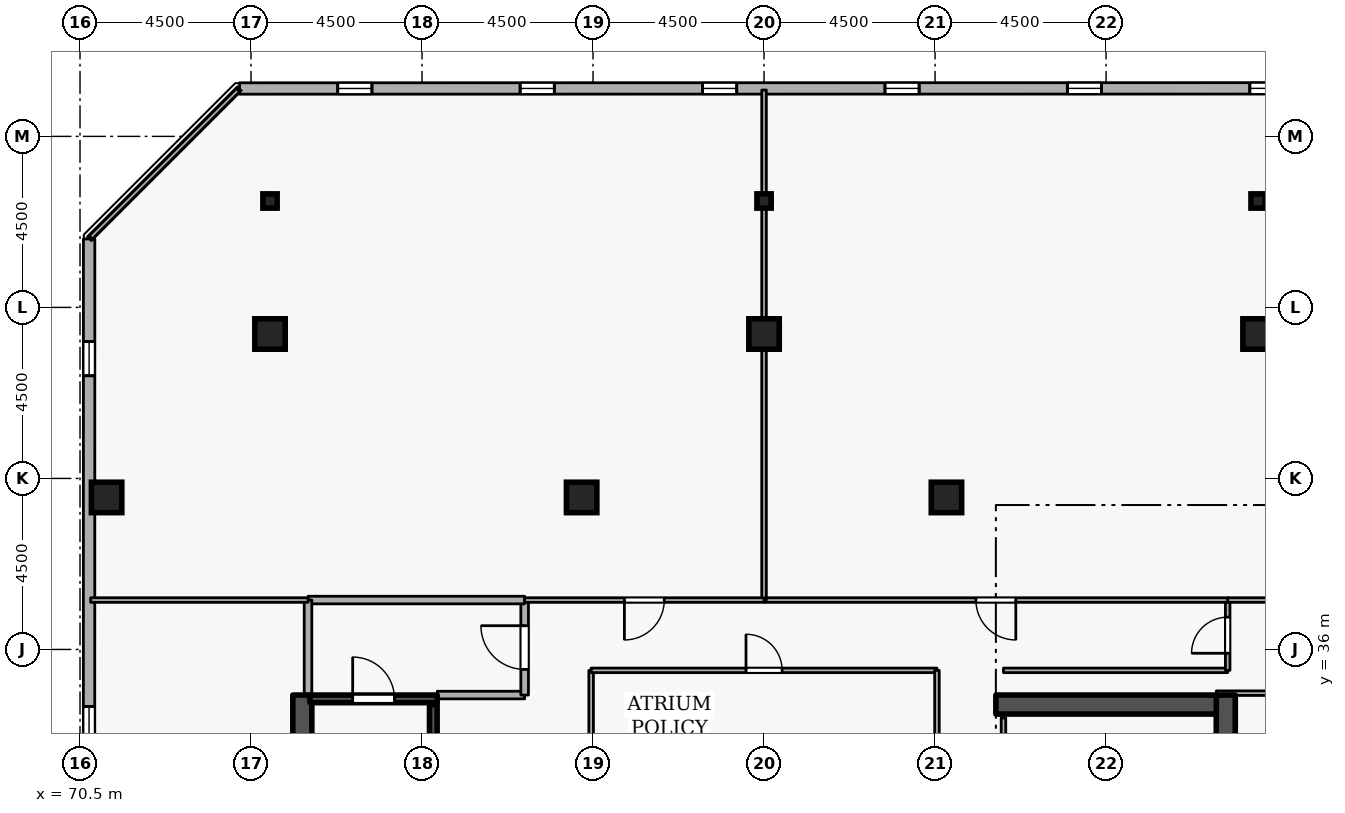
"""IFC4 building model, lengths in metres.
Left out: names, types, materials, properties, quantities, classifications, styles, units other than length and angle.
Written with IfcOpenShell. Run it as: python <this file> out.ifc"""

import sys

from ifc_helpers import new_model, si_unit, direction, frame, frame_2d, origin, origin_2d, place, context, subcontext, project, spatial, rectangle, i_section, extrude, element, fill, save


model = new_model("IFC4")
c1 = context("Model", 3, precision=1e-05, world=origin(), true_north=direction((0.0, 1.0)))
c2 = subcontext(c1, "Body", "Model", "MODEL_VIEW")
j1 = project(units=[si_unit("LENGTHUNIT", "METRE"), si_unit("PLANEANGLEUNIT", "RADIAN")], contexts=[c1])
p1 = place(None, origin())
s1 = spatial("IfcSite", under=j1, at=p1, CompositionType="ELEMENT")
p2 = place(p1, origin())
s2 = spatial("IfcBuilding", under=s1, at=p2, CompositionType="ELEMENT")
p3 = place(p2, frame((0.0, 0.0, 258.3)))
s3 = spatial("IfcBuildingStorey", under=s2, at=p3, CompositionType="ELEMENT", Elevation=258.3)
p4 = place(p3, frame((100.65, 19.2, 0.0), z_axis=(0.0, 0.0, 1.0), x_axis=(0.0, 1.0, 0.0)))
e1 = element("IfcWall", 1, at=p4, inside=s3, PredefinedType="SHEAR", context=c2, shape_type="SweptSolid", body=[
    extrude(rectangle(XDim=15.6, YDim=0.5, at=frame_2d((7.8, 0.0))), origin(), (0.0, 0.0, 1.0), 3.6),
])
p5 = place(p3, frame((94.6, 34.55, 0.0), z_axis=(0.0, 0.0, 1.0), x_axis=(1.0, 0.0, 0.0)))
e2 = element("IfcWall", 2, at=p5, inside=s3, PredefinedType="SHEAR", context=c2, shape_type="SweptSolid", body=[
    extrude(rectangle(XDim=5.8, YDim=0.5, at=frame_2d((2.9, 0.0))), origin(), (0.0, 0.0, 1.0), 3.6),
])
p6 = place(p3, frame((76.35, 19.2, 0.0), z_axis=(0.0, 0.0, 1.0), x_axis=(0.0, 1.0, 0.0)))
e3 = element("IfcWall", 3, at=p6, inside=s3, PredefinedType="SHEAR", context=c2, shape_type="SweptSolid", body=[
    extrude(rectangle(XDim=15.6, YDim=0.5, at=frame_2d((7.8, 0.0))), origin(), (0.0, 0.0, 1.0), 3.6),
])
for number, where, z_axis, x_axis in (
    (4, (101.5, 44.3, 0.0), (0.0, 0.0, 1.0), (1.0, 0.0, 0.0)),
    (5, (88.5, 44.3, 0.0), (0.0, 0.0, 1.0), (1.0, 0.0, 0.0)),
    (6, (75.5, 44.3, 0.0), (0.0, 0.0, 1.0), (1.0, 0.0, 0.0)),
    (7, (71.2, 40.0, 0.0), (0.0, 0.0, 1.0), (1.0, 0.0, 0.0)),
    (8, (93.3, 40.0, 0.0), (0.0, 0.0, 1.0), (1.0, 0.0, 0.0)),
    (9, (83.7, 40.0, 0.0), (0.0, 0.0, 1.0), (1.0, 0.0, 0.0)),
):
    element("IfcColumn", number, at=place(p3, frame(where, z_axis=z_axis, x_axis=x_axis)), inside=s3, PredefinedType="COLUMN", context=c2, shape_type="SweptSolid", body=[
        extrude(rectangle(XDim=0.8, YDim=0.8, at=origin_2d()), origin(), (0.0, 0.0, 1.0), 3.6),
    ])
for number, where, z_axis, x_axis in (
    (10, (101.5, 47.8, 0.0), (0.0, 0.0, 1.0), (1.0, 0.0, 0.0)),
    (11, (88.5, 47.8, 0.0), (0.0, 0.0, 1.0), (1.0, 0.0, 0.0)),
    (12, (75.5, 47.8, 0.0), (0.0, 0.0, 1.0), (1.0, 0.0, 0.0)),
):
    element("IfcColumn", number, at=place(p3, frame(where, z_axis=z_axis, x_axis=x_axis)), inside=s3, PredefinedType="COLUMN", context=c2, shape_type="SweptSolid", body=[
        extrude(i_section(OverallWidth=0.375, OverallDepth=0.375, WebThickness=0.017, FlangeThickness=0.027, FilletRadius=0.015, at=origin_2d()), origin(), (0.0, 0.0, 1.0), 3.6),
    ])
p7 = place(p3, frame((109.681, 50.765, 0.0), z_axis=(0.0, 0.0, 1.0), x_axis=(-0.999999991209, -0.000132597301, 0.0)))
e13 = element("IfcWall", 13, at=p7, inside=s3, PredefinedType="STANDARD", context=c2, shape_type="SweptSolid", body=[
    extrude(rectangle(XDim=34.983, YDim=0.3, at=frame_2d((17.492, 0.0))), origin(), (0.0, 0.0, 1.0), 2.7),
])
p8 = place(p7, frame((2.7, 0.0, 0.72)))
e14 = element("IfcOpeningElement", 14, at=p8, cuts=e13, PredefinedType="OPENING", context=c2, shape_type="SweptSolid", body=[
    extrude(rectangle(XDim=0.9, YDim=1.75, at=frame_2d((0.45, 0.875))), frame((0.0, 0.16, 0.0), z_axis=(0.0, -1.0, 0.0), x_axis=(1.0, 0.0, 0.0)), (0.0, 0.0, 1.0), 0.32),
])
p9 = place(p7, frame((7.5, 0.0, 0.72)))
e15 = element("IfcOpeningElement", 15, at=p9, cuts=e13, PredefinedType="OPENING", context=c2, shape_type="SweptSolid", body=[
    extrude(rectangle(XDim=0.9, YDim=1.75, at=frame_2d((0.45, 0.875))), frame((0.0, 0.16, 0.0), z_axis=(0.0, -1.0, 0.0), x_axis=(1.0, 0.0, 0.0)), (0.0, 0.0, 1.0), 0.32),
])
p10 = place(p7, frame((12.3, 0.0, 0.72)))
e16 = element("IfcOpeningElement", 16, at=p10, cuts=e13, PredefinedType="OPENING", context=c2, shape_type="SweptSolid", body=[
    extrude(rectangle(XDim=0.9, YDim=1.75, at=frame_2d((0.45, 0.875))), frame((0.0, 0.16, 0.0), z_axis=(0.0, -1.0, 0.0), x_axis=(1.0, 0.0, 0.0)), (0.0, 0.0, 1.0), 0.32),
])
p11 = place(p7, frame((17.1, 0.0, 0.72)))
e17 = element("IfcOpeningElement", 17, at=p11, cuts=e13, PredefinedType="OPENING", context=c2, shape_type="SweptSolid", body=[
    extrude(rectangle(XDim=0.9, YDim=1.75, at=frame_2d((0.45, 0.875))), frame((0.0, 0.16, 0.0), z_axis=(0.0, -1.0, 0.0), x_axis=(1.0, 0.0, 0.0)), (0.0, 0.0, 1.0), 0.32),
])
p12 = place(p7, frame((21.9, 0.0, 0.72)))
e18 = element("IfcOpeningElement", 18, at=p12, cuts=e13, PredefinedType="OPENING", context=c2, shape_type="SweptSolid", body=[
    extrude(rectangle(XDim=0.9, YDim=1.75, at=frame_2d((0.45, 0.875))), frame((0.0, 0.16, 0.0), z_axis=(0.0, -1.0, 0.0), x_axis=(1.0, 0.0, 0.0)), (0.0, 0.0, 1.0), 0.32),
])
p13 = place(p7, frame((26.7, 0.0, 0.72)))
e19 = element("IfcOpeningElement", 19, at=p13, cuts=e13, PredefinedType="OPENING", context=c2, shape_type="SweptSolid", body=[
    extrude(rectangle(XDim=0.9, YDim=1.75, at=frame_2d((0.45, 0.875))), frame((0.0, 0.16, 0.0), z_axis=(0.0, -1.0, 0.0), x_axis=(1.0, 0.0, 0.0)), (0.0, 0.0, 1.0), 0.32),
])
p14 = place(p7, frame((31.5, 0.0, 0.72)))
e20 = element("IfcOpeningElement", 20, at=p14, cuts=e13, PredefinedType="OPENING", context=c2, shape_type="SweptSolid", body=[
    extrude(rectangle(XDim=0.9, YDim=1.75, at=frame_2d((0.45, 0.875))), frame((0.0, 0.16, 0.0), z_axis=(0.0, -1.0, 0.0), x_axis=(1.0, 0.0, 0.0)), (0.0, 0.0, 1.0), 0.32),
])
p15 = place(p3, frame((70.74, 46.802, 0.0), z_axis=(0.0, 0.0, 1.0), x_axis=(-0.000132597301, -0.999999991209, 0.0)))
e21 = element("IfcWall", 21, at=p15, inside=s3, PredefinedType="STANDARD", context=c2, shape_type="SweptSolid", body=[
    extrude(rectangle(XDim=34.983, YDim=0.3, at=frame_2d((17.492, 0.0))), origin(), (0.0, 0.0, 1.0), 2.7),
])
p16 = place(p15, frame((2.7, 0.0, 0.72)))
e22 = element("IfcOpeningElement", 22, at=p16, cuts=e21, PredefinedType="OPENING", context=c2, shape_type="SweptSolid", body=[
    extrude(rectangle(XDim=0.9, YDim=1.75, at=frame_2d((0.45, 0.875))), frame((0.0, 0.16, 0.0), z_axis=(0.0, -1.0, 0.0), x_axis=(1.0, 0.0, 0.0)), (0.0, 0.0, 1.0), 0.32),
])
p17 = place(p15, frame((12.3, 0.0, 0.72)))
e23 = element("IfcOpeningElement", 23, at=p17, cuts=e21, PredefinedType="OPENING", context=c2, shape_type="SweptSolid", body=[
    extrude(rectangle(XDim=0.9, YDim=1.75, at=frame_2d((0.45, 0.875))), frame((0.0, 0.16, 0.0), z_axis=(0.0, -1.0, 0.0), x_axis=(1.0, 0.0, 0.0)), (0.0, 0.0, 1.0), 0.32),
])
p18 = place(p15, frame((17.1, 0.0, 0.72)))
e24 = element("IfcOpeningElement", 24, at=p18, cuts=e21, PredefinedType="OPENING", context=c2, shape_type="SweptSolid", body=[
    extrude(rectangle(XDim=0.9, YDim=1.75, at=frame_2d((0.45, 0.875))), frame((0.0, 0.16, 0.0), z_axis=(0.0, -1.0, 0.0), x_axis=(1.0, 0.0, 0.0)), (0.0, 0.0, 1.0), 0.32),
])
p19 = place(p15, frame((21.9, 0.0, 0.72)))
e25 = element("IfcOpeningElement", 25, at=p19, cuts=e21, PredefinedType="OPENING", context=c2, shape_type="SweptSolid", body=[
    extrude(rectangle(XDim=0.9, YDim=1.75, at=frame_2d((0.45, 0.875))), frame((0.0, 0.16, 0.0), z_axis=(0.0, -1.0, 0.0), x_axis=(1.0, 0.0, 0.0)), (0.0, 0.0, 1.0), 0.32),
])
p20 = place(p3, frame((76.55, 34.7, 0.0), z_axis=(0.0, 0.0, 1.0), x_axis=(1.0, 0.0, 0.0)))
e26 = element("IfcWall", 26, at=p20, inside=s3, PredefinedType="SHEAR", context=c2, shape_type="SweptSolid", body=[
    extrude(rectangle(XDim=3.35, YDim=0.2, at=frame_2d((1.675, 0.0))), origin(), (0.0, 0.0, 1.0), 3.6),
])
p21 = place(p20, frame((1.125, 0.0, 0.0)))
e27 = element("IfcOpeningElement", 27, at=p21, cuts=e26, PredefinedType="OPENING", context=c2, shape_type="SweptSolid", body=[
    extrude(rectangle(XDim=1.1, YDim=2.1, at=frame_2d((0.55, 1.05))), frame((0.0, 0.11, 0.0), z_axis=(0.0, -1.0, 0.0), x_axis=(1.0, 0.0, 0.0)), (0.0, 0.0, 1.0), 0.22),
])
p22 = place(p3, frame((79.797, 27.45, 0.0), z_axis=(0.0, 0.0, 1.0), x_axis=(0.0, 1.0, 0.0)))
e28 = element("IfcWall", 28, at=p22, inside=s3, PredefinedType="SHEAR", context=c2, shape_type="SweptSolid", body=[
    extrude(rectangle(XDim=7.1, YDim=0.2, at=frame_2d((3.55, 0.0))), origin(), (0.0, 0.0, 1.0), 3.6),
])
p23 = place(p3, frame((79.9, 34.8, 0.0), z_axis=(0.0, 0.0, 1.0), x_axis=(1.0, 0.0, 0.0)))
e29 = element("IfcWall", 29, at=p23, inside=s3, PredefinedType="STANDARD", context=c2, shape_type="SweptSolid", body=[
    extrude(rectangle(XDim=2.3, YDim=0.2, at=frame_2d((1.15, 0.0))), origin(), (0.0, 0.0, 1.0), 2.545),
])
p24 = place(p3, frame((82.2, 34.8, 0.0), z_axis=(0.0, 0.0, 1.0), x_axis=(0.0, 1.0, 0.0)))
e30 = element("IfcWall", 30, at=p24, inside=s3, PredefinedType="STANDARD", context=c2, shape_type="SweptSolid", body=[
    extrude(rectangle(XDim=2.5, YDim=0.2, at=frame_2d((1.25, 0.0))), origin(), (0.0, 0.0, 1.0), 3.34),
])
p25 = place(p24, frame((0.675, 0.0, 0.0)))
e31 = element("IfcOpeningElement", 31, at=p25, cuts=e30, PredefinedType="OPENING", context=c2, shape_type="SweptSolid", body=[
    extrude(rectangle(XDim=1.15, YDim=2.1, at=frame_2d((0.575, 1.05))), frame((0.0, 0.11, 0.0), z_axis=(0.0, -1.0, 0.0), x_axis=(1.0, 0.0, 0.0)), (0.0, 0.0, 1.0), 0.22),
])
p26 = place(p3, frame((82.2, 37.3, 0.0), z_axis=(0.0, 0.0, 1.0), x_axis=(-1.0, 0.0, 0.0)))
e32 = element("IfcWall", 32, at=p26, inside=s3, PredefinedType="STANDARD", context=c2, shape_type="SweptSolid", body=[
    extrude(rectangle(XDim=5.7, YDim=0.2, at=frame_2d((2.85, 0.0))), origin(), (0.0, 0.0, 1.0), 3.34),
])
p27 = place(p3, frame((76.5, 37.3, 0.0), z_axis=(0.0, 0.0, 1.0), x_axis=(0.0, -1.0, 0.0)))
e33 = element("IfcWall", 33, at=p27, inside=s3, PredefinedType="STANDARD", context=c2, shape_type="SweptSolid", body=[
    extrude(rectangle(XDim=2.5, YDim=0.2, at=frame_2d((1.25, 0.0))), origin(), (0.0, 0.0, 1.0), 3.34),
])
p28 = place(p3, frame((94.8, 32.1, 0.0), z_axis=(0.0, 0.0, 1.0), x_axis=(0.0, 1.0, 0.0)))
e34 = element("IfcWall", 34, at=p28, inside=s3, PredefinedType="PARTITIONING", context=c2, shape_type="SweptSolid", body=[
    extrude(rectangle(XDim=2.1, YDim=0.12, at=frame_2d((1.05, 0.0))), origin(), (0.0, 0.0, 1.0), 3.34),
])
p29 = place(p28, frame((0.575, 0.0, 0.0)))
e35 = element("IfcOpeningElement", 35, at=p29, cuts=e34, PredefinedType="OPENING", context=c2, shape_type="SweptSolid", body=[
    extrude(rectangle(XDim=0.95, YDim=2.1, at=frame_2d((0.475, 1.05))), frame((0.0, 0.07, 0.0), z_axis=(0.0, -1.0, 0.0), x_axis=(1.0, 0.0, 0.0)), (0.0, 0.0, 1.0), 0.14),
])
p30 = place(p3, frame((94.8, 35.45, 0.0), z_axis=(0.0, 0.0, 1.0), x_axis=(1.0, 0.0, 0.0)))
e36 = element("IfcWall", 36, at=p30, inside=s3, PredefinedType="PARTITIONING", context=c2, shape_type="SweptSolid", body=[
    extrude(rectangle(XDim=5.9, YDim=0.12, at=frame_2d((2.95, 0.0))), origin(), (0.0, 0.0, 1.0), 3.34),
])
p31 = place(p3, frame((100.7, 35.45, 0.0), z_axis=(0.0, 0.0, 1.0), x_axis=(0.0, 1.0, 0.0)))
e37 = element("IfcWall", 37, at=p31, inside=s3, PredefinedType="PARTITIONING", context=c2, shape_type="SweptSolid", body=[
    extrude(rectangle(XDim=1.85, YDim=0.12, at=frame_2d((0.925, 0.0))), origin(), (0.0, 0.0, 1.0), 3.34),
])
p32 = place(p31, frame((0.45, 0.0, 0.0)))
e38 = element("IfcOpeningElement", 38, at=p32, cuts=e37, PredefinedType="OPENING", context=c2, shape_type="SweptSolid", body=[
    extrude(rectangle(XDim=0.95, YDim=2.1, at=frame_2d((0.475, 1.05))), frame((0.0, 0.07, 0.0), z_axis=(0.0, -1.0, 0.0), x_axis=(1.0, 0.0, 0.0)), (0.0, 0.0, 1.0), 0.14),
])
p33 = place(p3, frame((100.7, 37.3, 0.0), z_axis=(0.0, 0.0, 1.0), x_axis=(1.0, 0.0, 0.0)))
e39 = element("IfcWall", 39, at=p33, inside=s3, PredefinedType="PARTITIONING", context=c2, shape_type="SweptSolid", body=[
    extrude(rectangle(XDim=11.52, YDim=0.12, at=frame_2d((5.76, 0.0))), origin(), (0.0, 0.0, 1.0), 3.34),
])
p34 = place(p3, frame((112.22, 34.85, 0.0), z_axis=(0.0, 0.0, 1.0), x_axis=(-1.0, 0.0, 0.0)))
e40 = element("IfcWall", 40, at=p34, inside=s3, PredefinedType="PARTITIONING", context=c2, shape_type="SweptSolid", body=[
    extrude(rectangle(XDim=11.82, YDim=0.12, at=frame_2d((5.91, 0.0))), origin(), (0.0, 0.0, 1.0), 2.545),
])
p35 = place(p3, frame((100.7, 37.3, 0.0), z_axis=(0.0, 0.0, 1.0), x_axis=(-1.0, 0.0, 0.0)))
e41 = element("IfcWall", 41, at=p35, inside=s3, PredefinedType="PARTITIONING", context=c2, shape_type="SweptSolid", body=[
    extrude(rectangle(XDim=12.2, YDim=0.12, at=frame_2d((6.1, 0.0))), origin(), (0.0, 0.0, 1.0), 3.34),
])
p36 = place(p35, frame((5.575, 0.0, 0.0)))
e42 = element("IfcOpeningElement", 42, at=p36, cuts=e41, PredefinedType="OPENING", context=c2, shape_type="SweptSolid", body=[
    extrude(rectangle(XDim=1.05, YDim=2.1, at=frame_2d((0.525, 1.05))), frame((0.0, 0.07, 0.0), z_axis=(0.0, -1.0, 0.0), x_axis=(1.0, 0.0, 0.0)), (0.0, 0.0, 1.0), 0.14),
])
p37 = place(p3, frame((88.5, 37.3, 0.0), z_axis=(0.0, 0.0, 1.0), x_axis=(0.0, 1.0, 0.0)))
e43 = element("IfcWall", 43, at=p37, inside=s3, PredefinedType="PARTITIONING", context=c2, shape_type="SweptSolid", body=[
    extrude(rectangle(XDim=13.42, YDim=0.12, at=frame_2d((6.71, 0.0))), origin(), (0.0, 0.0, 1.0), 2.932),
])
p38 = place(p3, frame((76.5, 37.3, 0.0), z_axis=(0.0, 0.0, 1.0), x_axis=(-1.0, 0.0, 0.0)))
e44 = element("IfcWall", 44, at=p38, inside=s3, PredefinedType="PARTITIONING", context=c2, shape_type="SweptSolid", body=[
    extrude(rectangle(XDim=5.72, YDim=0.12, at=frame_2d((2.86, 0.0))), origin(), (0.0, 0.0, 1.0), 3.34),
])
p39 = place(p3, frame((70.78, 46.84, 0.0), z_axis=(0.0, 0.0, 1.0), x_axis=(0.707106781187, 0.707106781187, 0.0)))
e45 = element("IfcWall", 45, at=p39, inside=s3, PredefinedType="PARTITIONING", context=c2, shape_type="SweptSolid", body=[
    extrude(rectangle(XDim=5.487, YDim=0.12, at=frame_2d((2.743, 0.0))), origin(), (0.0, 0.0, 1.0), 3.34),
])
p40 = place(p3, frame((88.5, 37.3, 0.0), z_axis=(0.0, 0.0, 1.0), x_axis=(-1.0, 0.0, 0.0)))
e46 = element("IfcWall", 46, at=p40, inside=s3, PredefinedType="PARTITIONING", context=c2, shape_type="SweptSolid", body=[
    extrude(rectangle(XDim=6.3, YDim=0.12, at=frame_2d((3.15, 0.0))), origin(), (0.0, 0.0, 1.0), 3.34),
])
p41 = place(p40, frame((2.625, 0.0, 0.0)))
e47 = element("IfcOpeningElement", 47, at=p41, cuts=e46, PredefinedType="OPENING", context=c2, shape_type="SweptSolid", body=[
    extrude(rectangle(XDim=1.05, YDim=2.1, at=frame_2d((0.525, 1.05))), frame((0.0, 0.07, 0.0), z_axis=(0.0, -1.0, 0.0), x_axis=(1.0, 0.0, 0.0)), (0.0, 0.0, 1.0), 0.14),
])
p42 = place(p3, frame((83.95, 32.2, 0.0), z_axis=(0.0, 0.0, 1.0), x_axis=(0.0, 1.0, 0.0)))
e48 = element("IfcWall", 48, at=p42, inside=s3, PredefinedType="PARTITIONING", context=c2, shape_type="SweptSolid", body=[
    extrude(rectangle(XDim=3.25, YDim=0.12, at=frame_2d((1.625, 0.0))), origin(), (0.0, 0.0, 1.0), 3.34),
])
p43 = place(p3, frame((83.95, 35.45, 0.0), z_axis=(0.0, 0.0, 1.0), x_axis=(1.0, 0.0, 0.0)))
e49 = element("IfcWall", 49, at=p43, inside=s3, PredefinedType="PARTITIONING", context=c2, shape_type="SweptSolid", body=[
    extrude(rectangle(XDim=9.1, YDim=0.12, at=frame_2d((4.55, 0.0))), origin(), (0.0, 0.0, 1.0), 3.34),
])
p44 = place(p43, frame((4.075, 0.0, 0.0)))
e50 = element("IfcOpeningElement", 50, at=p44, cuts=e49, PredefinedType="OPENING", context=c2, shape_type="SweptSolid", body=[
    extrude(rectangle(XDim=0.95, YDim=2.1, at=frame_2d((0.475, 1.05))), frame((0.0, 0.07, 0.0), z_axis=(0.0, -1.0, 0.0), x_axis=(1.0, 0.0, 0.0)), (0.0, 0.0, 1.0), 0.14),
])
p45 = place(p3, frame((93.05, 35.45, 0.0), z_axis=(0.0, 0.0, 1.0), x_axis=(0.0, -1.0, 0.0)))
e51 = element("IfcWall", 51, at=p45, inside=s3, PredefinedType="PARTITIONING", context=c2, shape_type="SweptSolid", body=[
    extrude(rectangle(XDim=3.25, YDim=0.12, at=frame_2d((1.625, 0.0))), origin(), (0.0, 0.0, 1.0), 3.34),
])
p46 = place(p9, origin())
e52 = element("IfcWindow", 52, at=p46, inside=s3, PartitioningType="SINGLE_PANEL", PredefinedType="WINDOW", context=c2, shape_type="SweptSolid", body=[
    extrude(rectangle(XDim=0.9, YDim=1.75, at=frame_2d((0.45, 0.875))), frame((0.0, 0.03, 0.0), z_axis=(0.0, -1.0, 0.0), x_axis=(1.0, 0.0, 0.0)), (0.0, 0.0, 1.0), 0.06),
])
fill(e15, e52)
p47 = place(p10, origin())
e53 = element("IfcWindow", 53, at=p47, inside=s3, PartitioningType="SINGLE_PANEL", PredefinedType="WINDOW", context=c2, shape_type="SweptSolid", body=[
    extrude(rectangle(XDim=0.9, YDim=1.75, at=frame_2d((0.45, 0.875))), frame((0.0, 0.03, 0.0), z_axis=(0.0, -1.0, 0.0), x_axis=(1.0, 0.0, 0.0)), (0.0, 0.0, 1.0), 0.06),
])
fill(e16, e53)
p48 = place(p11, origin())
e54 = element("IfcWindow", 54, at=p48, inside=s3, PartitioningType="SINGLE_PANEL", PredefinedType="WINDOW", context=c2, shape_type="SweptSolid", body=[
    extrude(rectangle(XDim=0.9, YDim=1.75, at=frame_2d((0.45, 0.875))), frame((0.0, 0.03, 0.0), z_axis=(0.0, -1.0, 0.0), x_axis=(1.0, 0.0, 0.0)), (0.0, 0.0, 1.0), 0.06),
])
fill(e17, e54)
p49 = place(p12, origin())
e55 = element("IfcWindow", 55, at=p49, inside=s3, PartitioningType="SINGLE_PANEL", PredefinedType="WINDOW", context=c2, shape_type="SweptSolid", body=[
    extrude(rectangle(XDim=0.9, YDim=1.75, at=frame_2d((0.45, 0.875))), frame((0.0, 0.03, 0.0), z_axis=(0.0, -1.0, 0.0), x_axis=(1.0, 0.0, 0.0)), (0.0, 0.0, 1.0), 0.06),
])
fill(e18, e55)
p50 = place(p13, origin())
e56 = element("IfcWindow", 56, at=p50, inside=s3, PartitioningType="SINGLE_PANEL", PredefinedType="WINDOW", context=c2, shape_type="SweptSolid", body=[
    extrude(rectangle(XDim=0.9, YDim=1.75, at=frame_2d((0.45, 0.875))), frame((0.0, 0.03, 0.0), z_axis=(0.0, -1.0, 0.0), x_axis=(1.0, 0.0, 0.0)), (0.0, 0.0, 1.0), 0.06),
])
fill(e19, e56)
p51 = place(p14, origin())
e57 = element("IfcWindow", 57, at=p51, inside=s3, PartitioningType="SINGLE_PANEL", PredefinedType="WINDOW", context=c2, shape_type="SweptSolid", body=[
    extrude(rectangle(XDim=0.9, YDim=1.75, at=frame_2d((0.45, 0.875))), frame((0.0, 0.03, 0.0), z_axis=(0.0, -1.0, 0.0), x_axis=(1.0, 0.0, 0.0)), (0.0, 0.0, 1.0), 0.06),
])
fill(e20, e57)
p52 = place(p16, origin())
e58 = element("IfcWindow", 58, at=p52, inside=s3, PartitioningType="SINGLE_PANEL", PredefinedType="WINDOW", context=c2, shape_type="SweptSolid", body=[
    extrude(rectangle(XDim=0.9, YDim=1.75, at=frame_2d((0.45, 0.875))), frame((0.0, 0.03, 0.0), z_axis=(0.0, -1.0, 0.0), x_axis=(1.0, 0.0, 0.0)), (0.0, 0.0, 1.0), 0.06),
])
fill(e22, e58)
p53 = place(p17, origin())
e59 = element("IfcWindow", 59, at=p53, inside=s3, PartitioningType="SINGLE_PANEL", PredefinedType="WINDOW", context=c2, shape_type="SweptSolid", body=[
    extrude(rectangle(XDim=0.9, YDim=1.75, at=frame_2d((0.45, 0.875))), frame((0.0, 0.03, 0.0), z_axis=(0.0, -1.0, 0.0), x_axis=(1.0, 0.0, 0.0)), (0.0, 0.0, 1.0), 0.06),
])
fill(e23, e59)
p54 = place(p21, origin())
e60 = element("IfcDoor", 60, at=p54, inside=s3, OperationType="SINGLE_SWING_LEFT", PredefinedType="DOOR", context=c2, shape_type="SweptSolid", body=[
    extrude(rectangle(XDim=1.1, YDim=2.1, at=frame_2d((0.55, 1.05))), frame((0.0, 0.025, 0.0), z_axis=(0.0, -1.0, 0.0), x_axis=(1.0, 0.0, 0.0)), (0.0, 0.0, 1.0), 0.05),
])
fill(e27, e60)
p55 = place(p25, origin())
e61 = element("IfcDoor", 61, at=p55, inside=s3, OperationType="SINGLE_SWING_RIGHT", PredefinedType="DOOR", context=c2, shape_type="SweptSolid", body=[
    extrude(rectangle(XDim=1.15, YDim=2.1, at=frame_2d((0.575, 1.05))), frame((0.0, 0.025, 0.0), z_axis=(0.0, -1.0, 0.0), x_axis=(1.0, 0.0, 0.0)), (0.0, 0.0, 1.0), 0.05),
])
fill(e31, e61)
p56 = place(p32, origin())
e62 = element("IfcDoor", 62, at=p56, inside=s3, OperationType="SINGLE_SWING_LEFT", PredefinedType="DOOR", context=c2, shape_type="SweptSolid", body=[
    extrude(rectangle(XDim=0.95, YDim=2.1, at=frame_2d((0.475, 1.05))), frame((0.0, 0.025, 0.0), z_axis=(0.0, -1.0, 0.0), x_axis=(1.0, 0.0, 0.0)), (0.0, 0.0, 1.0), 0.05),
])
fill(e38, e62)
p57 = place(p36, origin())
e63 = element("IfcDoor", 63, at=p57, inside=s3, OperationType="SINGLE_SWING_LEFT", PredefinedType="DOOR", context=c2, shape_type="SweptSolid", body=[
    extrude(rectangle(XDim=1.05, YDim=2.1, at=frame_2d((0.525, 1.05))), frame((0.0, 0.025, 0.0), z_axis=(0.0, -1.0, 0.0), x_axis=(1.0, 0.0, 0.0)), (0.0, 0.0, 1.0), 0.05),
])
fill(e42, e63)
p58 = place(p41, origin())
e64 = element("IfcDoor", 64, at=p58, inside=s3, OperationType="SINGLE_SWING_RIGHT", PredefinedType="DOOR", context=c2, shape_type="SweptSolid", body=[
    extrude(rectangle(XDim=1.05, YDim=2.1, at=frame_2d((0.525, 1.05))), frame((0.0, 0.025, 0.0), z_axis=(0.0, -1.0, 0.0), x_axis=(1.0, 0.0, 0.0)), (0.0, 0.0, 1.0), 0.05),
])
fill(e47, e64)
p59 = place(p44, origin())
e65 = element("IfcDoor", 65, at=p59, inside=s3, OperationType="SINGLE_SWING_LEFT", PredefinedType="DOOR", context=c2, shape_type="SweptSolid", body=[
    extrude(rectangle(XDim=0.95, YDim=2.1, at=frame_2d((0.475, 1.05))), frame((0.0, 0.025, 0.0), z_axis=(0.0, -1.0, 0.0), x_axis=(1.0, 0.0, 0.0)), (0.0, 0.0, 1.0), 0.05),
])
fill(e50, e65)
save(model, sys.argv[1])
